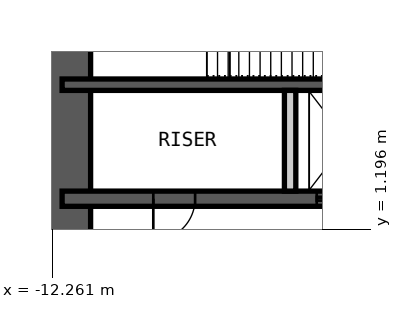
"""IFC4 building model, lengths in metres.
Left out: names, types, materials, properties, quantities, classifications, styles, units other than length and angle.
Written with IfcOpenShell. Run it as: python <this file> out.ifc"""

import sys

from ifc_helpers import new_model, si_unit, direction, frame, frame_2d, origin, place, context, subcontext, project, spatial, rectangle, extrude, element, fill, save


model = new_model("IFC4")
c1 = context("Model", 3, precision=1e-05, world=origin(), true_north=direction((0.0, 1.0)))
c2 = subcontext(c1, "Body", "Model", "MODEL_VIEW")
j1 = project(units=[si_unit("LENGTHUNIT", "METRE"), si_unit("PLANEANGLEUNIT", "RADIAN")], contexts=[c1])
p1 = place(None, origin())
s1 = spatial("IfcSite", under=j1, at=p1, CompositionType="ELEMENT")
p2 = place(p1, origin())
s2 = spatial("IfcBuilding", under=s1, at=p2, CompositionType="ELEMENT")
p3 = place(p2, frame((0.0, 0.0, 62.0)))
s3 = spatial("IfcBuildingStorey", under=s2, at=p3, CompositionType="ELEMENT", Elevation=62.0)
p4 = place(p3, frame((-12.0, -9.0, 0.0), z_axis=(0.0, 0.0, 1.0), x_axis=(0.0, 1.0, 0.0)))
e1 = element("IfcWall", 1, at=p4, inside=s3, PredefinedType="SHEAR", context=c2, shape_type="SweptSolid", body=[
    extrude(rectangle(XDim=18.0, YDim=1.5, at=frame_2d((9.0, 0.0))), origin(), (0.0, 0.0, 1.0), 5.0),
])
p5 = place(p4, frame((8.1, 0.0, 0.0)))
e2 = element("IfcOpeningElement", 2, at=p5, cuts=e1, PredefinedType="OPENING", context=c2, shape_type="SweptSolid", body=[
    extrude(rectangle(XDim=1.8, YDim=2.1, at=frame_2d((0.9, 1.05))), frame((0.0, 0.76, 0.0), z_axis=(0.0, -1.0, 0.0), x_axis=(1.0, 0.0, 0.0)), (0.0, 0.0, 1.0), 1.52),
])
p6 = place(p3, frame((-12.0, 5.0, 0.0), z_axis=(0.0, 0.0, 1.0), x_axis=(1.0, 0.0, 0.0)))
e3 = element("IfcWall", 3, at=p6, inside=s3, PredefinedType="SHEAR", context=c2, shape_type="SweptSolid", body=[
    extrude(rectangle(XDim=24.0, YDim=0.3, at=frame_2d((12.0, 0.0))), origin(), (0.0, 0.0, 1.0), 5.0),
])
p7 = place(p3, frame((-12.0, 2.0, 0.0), z_axis=(0.0, 0.0, 1.0), x_axis=(1.0, 0.0, 0.0)))
e4 = element("IfcWall", 4, at=p7, inside=s3, PredefinedType="SHEAR", context=c2, shape_type="SweptSolid", body=[
    extrude(rectangle(XDim=24.0, YDim=0.4, at=frame_2d((12.0, 0.0))), origin(), (0.0, 0.0, 1.0), 5.0),
])
p8 = place(p7, frame((2.4, 0.0, 0.0)))
e5 = element("IfcOpeningElement", 5, at=p8, cuts=e4, PredefinedType="OPENING", context=c2, shape_type="SweptSolid", body=[
    extrude(rectangle(XDim=1.1, YDim=2.1, at=frame_2d((0.55, 1.05))), frame((0.0, 0.21, 0.0), z_axis=(0.0, -1.0, 0.0), x_axis=(1.0, 0.0, 0.0)), (0.0, 0.0, 1.0), 0.42),
])
p9 = place(p7, frame((22.0, 0.0, 0.0)))
e6 = element("IfcOpeningElement", 6, at=p9, cuts=e4, PredefinedType="OPENING", context=c2, shape_type="SweptSolid", body=[
    extrude(rectangle(XDim=1.1, YDim=2.1, at=frame_2d((0.55, 1.05))), frame((0.0, 0.21, 0.0), z_axis=(0.0, -1.0, 0.0), x_axis=(1.0, 0.0, 0.0)), (0.0, 0.0, 1.0), 0.42),
])
p10 = place(p7, frame((10.15, 0.0, 0.0)))
e7 = element("IfcOpeningElement", 7, at=p10, cuts=e4, PredefinedType="OPENING", context=c2, shape_type="SweptSolid", body=[
    extrude(rectangle(XDim=1.0, YDim=2.1, at=frame_2d((0.5, 1.05))), frame((0.0, 0.21, 0.0), z_axis=(0.0, -1.0, 0.0), x_axis=(1.0, 0.0, 0.0)), (0.0, 0.0, 1.0), 0.42),
])
p11 = place(p7, frame((6.7, 0.0, 0.0)))
e8 = element("IfcOpeningElement", 8, at=p11, cuts=e4, PredefinedType="OPENING", context=c2, shape_type="SweptSolid", body=[
    extrude(rectangle(XDim=1.4, YDim=2.4, at=frame_2d((0.7, 1.2))), frame((0.0, 0.21, 0.0), z_axis=(0.0, -1.0, 0.0), x_axis=(1.0, 0.0, 0.0)), (0.0, 0.0, 1.0), 0.42),
])
p12 = place(p7, frame((13.35, 0.0, 0.0)))
e9 = element("IfcOpeningElement", 9, at=p12, cuts=e4, PredefinedType="OPENING", context=c2, shape_type="SweptSolid", body=[
    extrude(rectangle(XDim=1.1, YDim=2.4, at=frame_2d((0.55, 1.2))), frame((0.0, 0.21, 0.0), z_axis=(0.0, -1.0, 0.0), x_axis=(1.0, 0.0, 0.0)), (0.0, 0.0, 1.0), 0.42),
])
p13 = place(p7, frame((16.15, 0.0, 0.0)))
e10 = element("IfcOpeningElement", 10, at=p13, cuts=e4, PredefinedType="OPENING", context=c2, shape_type="SweptSolid", body=[
    extrude(rectangle(XDim=1.1, YDim=2.4, at=frame_2d((0.55, 1.2))), frame((0.0, 0.21, 0.0), z_axis=(0.0, -1.0, 0.0), x_axis=(1.0, 0.0, 0.0)), (0.0, 0.0, 1.0), 0.42),
])
p14 = place(p7, frame((18.95, 0.0, 0.0)))
e11 = element("IfcOpeningElement", 11, at=p14, cuts=e4, PredefinedType="OPENING", context=c2, shape_type="SweptSolid", body=[
    extrude(rectangle(XDim=1.1, YDim=2.4, at=frame_2d((0.55, 1.2))), frame((0.0, 0.21, 0.0), z_axis=(0.0, -1.0, 0.0), x_axis=(1.0, 0.0, 0.0)), (0.0, 0.0, 1.0), 0.42),
])
p15 = place(p3, frame((-6.0, 2.2, 0.0), z_axis=(0.0, 0.0, 1.0), x_axis=(0.0, 1.0, 0.0)))
e12 = element("IfcWall", 12, at=p15, inside=s3, PredefinedType="PARTITIONING", context=c2, shape_type="SweptSolid", body=[
    extrude(rectangle(XDim=2.65, YDim=0.3, at=frame_2d((1.325, 0.0))), origin(), (0.0, 0.0, 1.0), 4.78),
])
p16 = place(p8, origin())
e13 = element("IfcDoor", 13, at=p16, inside=s3, OperationType="SINGLE_SWING_LEFT", PredefinedType="DOOR", context=c2, shape_type="SweptSolid", body=[
    extrude(rectangle(XDim=1.1, YDim=2.1, at=frame_2d((0.55, 1.05))), frame((0.0, 0.025, 0.0), z_axis=(0.0, -1.0, 0.0), x_axis=(1.0, 0.0, 0.0)), (0.0, 0.0, 1.0), 0.05),
])
fill(e5, e13)
p17 = place(p11, origin())
e14 = element("IfcDoor", 14, at=p17, inside=s3, OperationType="DOUBLE_DOOR_SLIDING", PredefinedType="DOOR", context=c2, shape_type="SweptSolid", body=[
    extrude(rectangle(XDim=1.4, YDim=2.4, at=frame_2d((0.7, 1.2))), frame((0.0, 0.025, 0.0), z_axis=(0.0, -1.0, 0.0), x_axis=(1.0, 0.0, 0.0)), (0.0, 0.0, 1.0), 0.05),
])
fill(e8, e14)
save(model, sys.argv[1])
